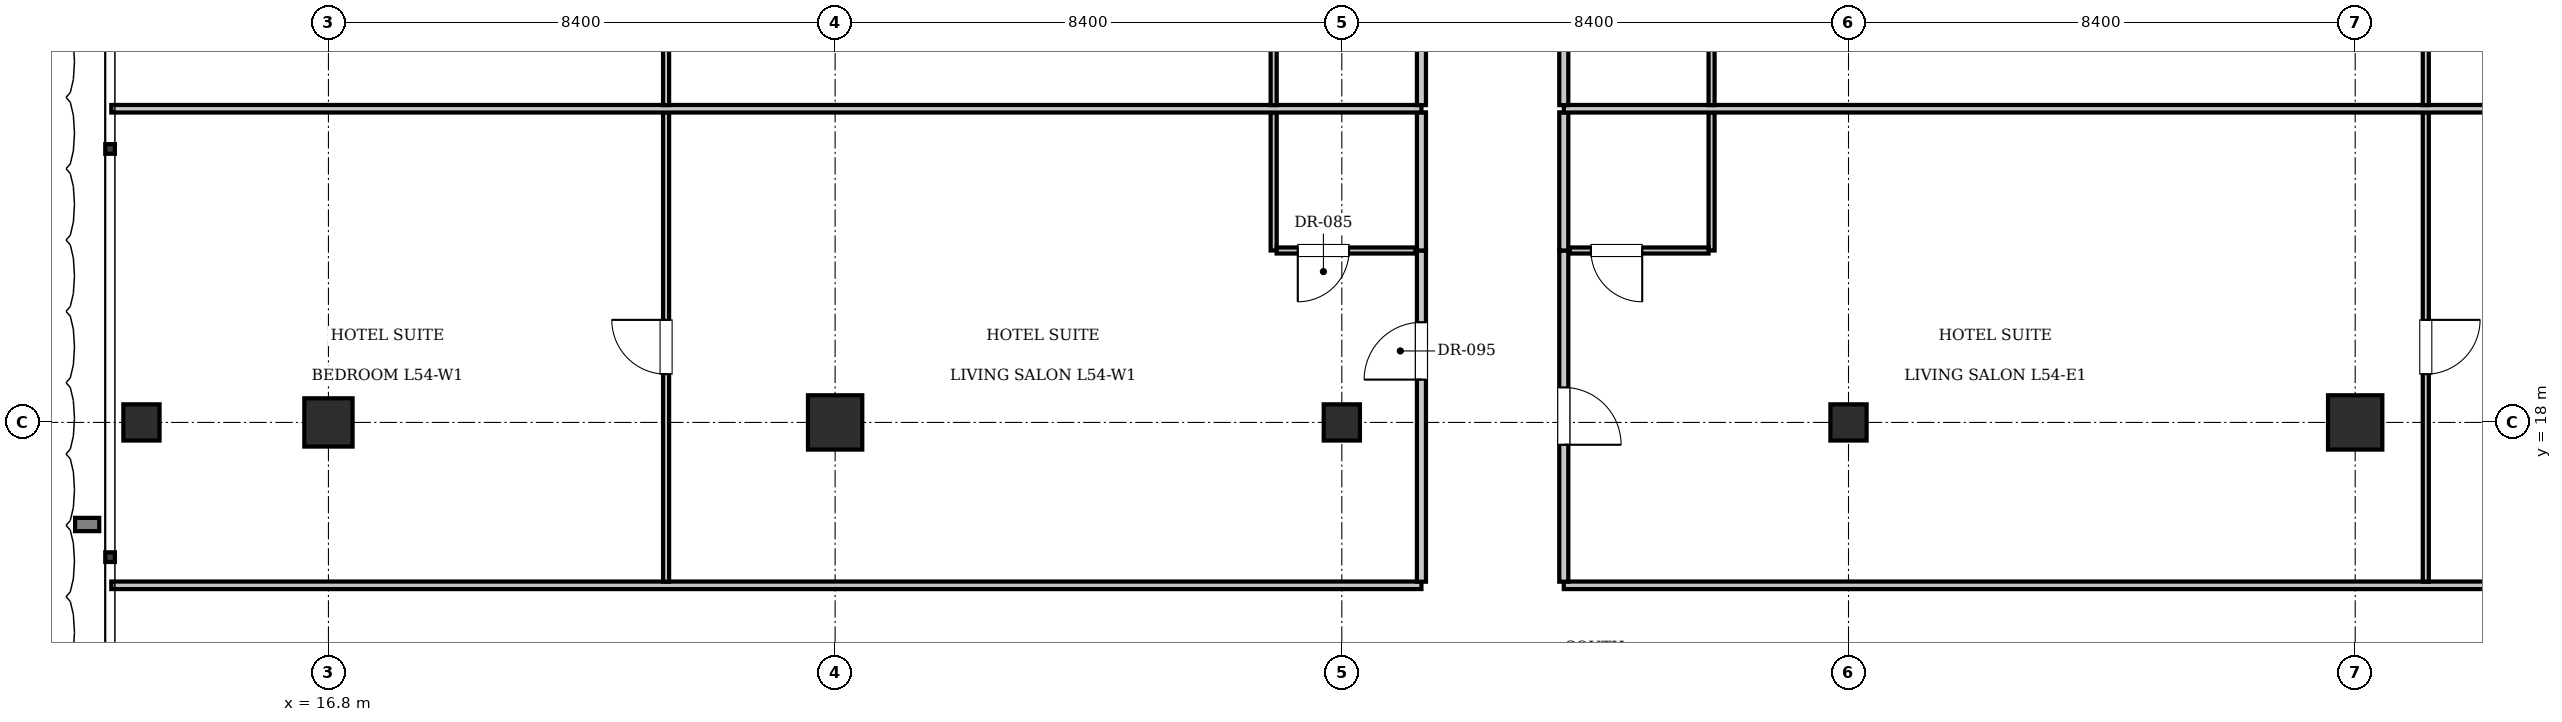
"""IFC4 building model, lengths in metres.
Left out: names, types, materials, properties, quantities, classifications, styles, units other than length and angle.
Written with IfcOpenShell. Run it as: python <this file> out.ifc"""

import sys

from ifc_helpers import new_model, si_unit, direction, frame, frame_2d, origin, origin_2d, place, context, subcontext, project, spatial, rectangle, i_section, extrude, element, fill, save


model = new_model("IFC4")
c1 = context("Model", 3, precision=1e-05, world=origin(), true_north=direction((0.0, 1.0)))
c2 = subcontext(c1, "Body", "Model", "MODEL_VIEW")
j1 = project(units=[si_unit("LENGTHUNIT", "METRE"), si_unit("PLANEANGLEUNIT", "RADIAN")], contexts=[c1])
p1 = place(None, origin())
s1 = spatial("IfcSite", under=j1, at=p1, CompositionType="ELEMENT")
p2 = place(p1, origin())
s2 = spatial("IfcBuilding", under=s1, at=p2, CompositionType="ELEMENT")
p3 = place(p2, frame((0.0, 0.0, 219.8)))
s3 = spatial("IfcBuildingStorey", under=s2, at=p3, CompositionType="ELEMENT", Elevation=219.8)
for number, where, z_axis, x_axis in (
    (1, (25.2, 18.0, 0.0), (0.0, 0.0, 1.0), (1.0, 0.0, 0.0)),
    (2, (50.4, 18.0, 0.0), (0.0, 0.0, 1.0), (1.0, 0.0, 0.0)),
):
    element("IfcColumn", number, at=place(p3, frame(where, z_axis=z_axis, x_axis=x_axis)), inside=s3, PredefinedType="COLUMN", context=c2, shape_type="SweptSolid", body=[
        extrude(rectangle(XDim=0.9, YDim=0.9, at=origin_2d()), origin(), (0.0, 0.0, 1.0), 3.85),
    ])
for number, where, z_axis, x_axis in (
    (3, (33.6, 18.0, 0.0), (0.0, 0.0, 1.0), (1.0, 0.0, 0.0)),
    (4, (42.0, 18.0, 0.0), (0.0, 0.0, 1.0), (1.0, 0.0, 0.0)),
):
    element("IfcColumn", number, at=place(p3, frame(where, z_axis=z_axis, x_axis=x_axis)), inside=s3, PredefinedType="COLUMN", context=c2, shape_type="SweptSolid", body=[
        extrude(i_section(OverallWidth=0.6, OverallDepth=0.6, WebThickness=0.025, FlangeThickness=0.038, at=origin_2d()), origin(), (0.0, 0.0, 1.0), 3.85),
    ])
p4 = place(p3, frame((16.8, 18.0, 0.0), z_axis=(0.0, 0.0, 1.0), x_axis=(1.0, 0.0, 0.0)))
e5 = element("IfcColumn", 5, at=p4, inside=s3, PredefinedType="COLUMN", context=c2, shape_type="SweptSolid", body=[
    extrude(rectangle(XDim=0.8, YDim=0.8, at=origin_2d()), origin(), (0.0, 0.0, 1.0), 3.85),
])
p5 = place(p3, frame((13.7, 18.0, 0.0), z_axis=(0.0, 0.0, 1.0), x_axis=(1.0, 0.0, 0.0)))
e6 = element("IfcColumn", 6, at=p5, inside=s3, PredefinedType="COLUMN", context=c2, shape_type="SweptSolid", body=[
    extrude(i_section(OverallWidth=0.6, OverallDepth=0.6, WebThickness=0.025, FlangeThickness=0.038, at=origin_2d()), origin(), (0.0, 0.0, 1.0), 3.85),
])
p6 = place(p3, frame((13.2, 15.3, 0.0), z_axis=(0.0, 0.0, 1.0), x_axis=(1.0, 0.0, 0.0)))
e7 = element("IfcWall", 7, at=p6, inside=s3, PredefinedType="PARTITIONING", context=c2, shape_type="SweptSolid", body=[
    extrude(rectangle(XDim=21.72, YDim=0.125, at=frame_2d((10.86, 0.0))), origin(), (0.0, 0.0, 1.0), 3.61),
])
p7 = place(p3, frame((37.28, 15.3, 0.0), z_axis=(0.0, 0.0, 1.0), x_axis=(1.0, 0.0, 0.0)))
e8 = element("IfcWall", 8, at=p7, inside=s3, PredefinedType="PARTITIONING", context=c2, shape_type="SweptSolid", body=[
    extrude(rectangle(XDim=25.12, YDim=0.125, at=frame_2d((12.56, 0.0))), origin(), (0.0, 0.0, 1.0), 3.61),
])
p8 = place(p3, frame((34.92, 15.36, 0.0), z_axis=(0.0, 0.0, 1.0), x_axis=(0.0, 1.0, 0.0)))
e9 = element("IfcWall", 9, at=p8, inside=s3, PredefinedType="PARTITIONING", context=c2, shape_type="SweptSolid", body=[
    extrude(rectangle(XDim=5.49, YDim=0.15, at=frame_2d((2.745, 0.0))), origin(), (0.0, 0.0, 1.0), 3.61),
])
p9 = place(p8, frame((3.35, 0.0, 0.0)))
e10 = element("IfcOpeningElement", 10, at=p9, cuts=e9, PredefinedType="OPENING", context=c2, shape_type="SweptSolid", body=[
    extrude(rectangle(XDim=0.95, YDim=2.15, at=frame_2d((0.475, 1.075))), frame((0.0, 0.085, 0.0), z_axis=(0.0, -1.0, 0.0), x_axis=(1.0, 0.0, 0.0)), (0.0, 0.0, 1.0), 0.17),
])
p10 = place(p3, frame((34.92, 20.85, 0.0), z_axis=(0.0, 0.0, 1.0), x_axis=(0.0, 1.0, 0.0)))
e11 = element("IfcWall", 11, at=p10, inside=s3, PredefinedType="PARTITIONING", context=c2, shape_type="SweptSolid", body=[
    extrude(rectangle(XDim=2.29, YDim=0.15, at=frame_2d((1.145, 0.0))), origin(), (0.0, 0.0, 1.0), 3.61),
])
p11 = place(p3, frame((32.47, 20.85, 0.0), z_axis=(0.0, 0.0, 1.0), x_axis=(0.0, 1.0, 0.0)))
e12 = element("IfcWall", 12, at=p11, inside=s3, PredefinedType="PARTITIONING", context=c2, shape_type="SweptSolid", body=[
    extrude(rectangle(XDim=2.29, YDim=0.1, at=frame_2d((1.145, 0.0))), origin(), (0.0, 0.0, 1.0), 3.61),
])
p12 = place(p3, frame((32.52, 20.85, 0.0), z_axis=(0.0, 0.0, 1.0), x_axis=(1.0, 0.0, 0.0)))
e13 = element("IfcWall", 13, at=p12, inside=s3, PredefinedType="PARTITIONING", context=c2, shape_type="SweptSolid", body=[
    extrude(rectangle(XDim=2.3, YDim=0.1, at=frame_2d((1.15, 0.0))), origin(), (0.0, 0.0, 1.0), 3.61),
])
p13 = place(p12, frame((0.35, 0.0, 0.0)))
e14 = element("IfcOpeningElement", 14, at=p13, cuts=e13, PredefinedType="OPENING", context=c2, shape_type="SweptSolid", body=[
    extrude(rectangle(XDim=0.85, YDim=2.1, at=frame_2d((0.425, 1.05))), frame((0.0, 0.06, 0.0), z_axis=(0.0, -1.0, 0.0), x_axis=(1.0, 0.0, 0.0)), (0.0, 0.0, 1.0), 0.12),
])
p14 = place(p3, frame((22.398, 15.36, 0.0), z_axis=(0.0, 0.0, 1.0), x_axis=(0.0, 1.0, 0.0)))
e15 = element("IfcWall", 15, at=p14, inside=s3, PredefinedType="PARTITIONING", context=c2, shape_type="SweptSolid", body=[
    extrude(rectangle(XDim=7.78, YDim=0.1, at=frame_2d((3.89, 0.0))), origin(), (0.0, 0.0, 1.0), 3.61),
])
p15 = place(p14, frame((3.44, 0.0, 0.0)))
e16 = element("IfcOpeningElement", 16, at=p15, cuts=e15, PredefinedType="OPENING", context=c2, shape_type="SweptSolid", body=[
    extrude(rectangle(XDim=0.9, YDim=2.1, at=frame_2d((0.45, 1.05))), frame((0.0, 0.06, 0.0), z_axis=(0.0, -1.0, 0.0), x_axis=(1.0, 0.0, 0.0)), (0.0, 0.0, 1.0), 0.12),
])
p16 = place(p3, frame((37.28, 15.36, 0.0), z_axis=(0.0, 0.0, 1.0), x_axis=(0.0, 1.0, 0.0)))
e17 = element("IfcWall", 17, at=p16, inside=s3, PredefinedType="PARTITIONING", context=c2, shape_type="SweptSolid", body=[
    extrude(rectangle(XDim=5.49, YDim=0.15, at=frame_2d((2.745, 0.0))), origin(), (0.0, 0.0, 1.0), 3.61),
])
p17 = place(p16, frame((2.27, 0.0, 0.0)))
e18 = element("IfcOpeningElement", 18, at=p17, cuts=e17, PredefinedType="OPENING", context=c2, shape_type="SweptSolid", body=[
    extrude(rectangle(XDim=0.95, YDim=2.15, at=frame_2d((0.475, 1.075))), frame((0.0, 0.085, 0.0), z_axis=(0.0, -1.0, 0.0), x_axis=(1.0, 0.0, 0.0)), (0.0, 0.0, 1.0), 0.17),
])
p18 = place(p3, frame((37.28, 20.85, 0.0), z_axis=(0.0, 0.0, 1.0), x_axis=(0.0, 1.0, 0.0)))
e19 = element("IfcWall", 19, at=p18, inside=s3, PredefinedType="PARTITIONING", context=c2, shape_type="SweptSolid", body=[
    extrude(rectangle(XDim=2.29, YDim=0.15, at=frame_2d((1.145, 0.0))), origin(), (0.0, 0.0, 1.0), 3.61),
])
p19 = place(p3, frame((39.73, 20.85, 0.0), z_axis=(0.0, 0.0, 1.0), x_axis=(0.0, 1.0, 0.0)))
e20 = element("IfcWall", 20, at=p19, inside=s3, PredefinedType="PARTITIONING", context=c2, shape_type="SweptSolid", body=[
    extrude(rectangle(XDim=2.29, YDim=0.1, at=frame_2d((1.145, 0.0))), origin(), (0.0, 0.0, 1.0), 3.61),
])
p20 = place(p3, frame((37.38, 20.85, 0.0), z_axis=(0.0, 0.0, 1.0), x_axis=(1.0, 0.0, 0.0)))
e21 = element("IfcWall", 21, at=p20, inside=s3, PredefinedType="PARTITIONING", context=c2, shape_type="SweptSolid", body=[
    extrude(rectangle(XDim=2.3, YDim=0.1, at=frame_2d((1.15, 0.0))), origin(), (0.0, 0.0, 1.0), 3.61),
])
p21 = place(p20, frame((0.35, 0.0, 0.0)))
e22 = element("IfcOpeningElement", 22, at=p21, cuts=e21, PredefinedType="OPENING", context=c2, shape_type="SweptSolid", body=[
    extrude(rectangle(XDim=0.85, YDim=2.1, at=frame_2d((0.425, 1.05))), frame((0.0, 0.06, 0.0), z_axis=(0.0, -1.0, 0.0), x_axis=(1.0, 0.0, 0.0)), (0.0, 0.0, 1.0), 0.12),
])
p22 = place(p3, frame((51.57, 15.36, 0.0), z_axis=(0.0, 0.0, 1.0), x_axis=(0.0, 1.0, 0.0)))
e23 = element("IfcWall", 23, at=p22, inside=s3, PredefinedType="PARTITIONING", context=c2, shape_type="SweptSolid", body=[
    extrude(rectangle(XDim=7.78, YDim=0.1, at=frame_2d((3.89, 0.0))), origin(), (0.0, 0.0, 1.0), 3.61),
])
p23 = place(p22, frame((3.44, 0.0, 0.0)))
e24 = element("IfcOpeningElement", 24, at=p23, cuts=e23, PredefinedType="OPENING", context=c2, shape_type="SweptSolid", body=[
    extrude(rectangle(XDim=0.9, YDim=2.1, at=frame_2d((0.45, 1.05))), frame((0.0, 0.06, 0.0), z_axis=(0.0, -1.0, 0.0), x_axis=(1.0, 0.0, 0.0)), (0.0, 0.0, 1.0), 0.12),
])
p24 = place(p3, frame((13.2, 23.2, 0.0), z_axis=(0.0, 0.0, 1.0), x_axis=(1.0, 0.0, 0.0)))
e25 = element("IfcWall", 25, at=p24, inside=s3, PredefinedType="PARTITIONING", context=c2, shape_type="SweptSolid", body=[
    extrude(rectangle(XDim=21.72, YDim=0.125, at=frame_2d((10.86, 0.0))), origin(), (0.0, 0.0, 1.0), 3.61),
])
p25 = place(p3, frame((37.28, 23.2, 0.0), z_axis=(0.0, 0.0, 1.0), x_axis=(1.0, 0.0, 0.0)))
e26 = element("IfcWall", 26, at=p25, inside=s3, PredefinedType="PARTITIONING", context=c2, shape_type="SweptSolid", body=[
    extrude(rectangle(XDim=25.12, YDim=0.125, at=frame_2d((12.56, 0.0))), origin(), (0.0, 0.0, 1.0), 3.61),
])
p26 = place(p3, frame((34.92, 23.26, 0.0), z_axis=(0.0, 0.0, 1.0), x_axis=(0.0, 1.0, 0.0)))
e27 = element("IfcWall", 27, at=p26, inside=s3, PredefinedType="PARTITIONING", context=c2, shape_type="SweptSolid", body=[
    extrude(rectangle(XDim=2.29, YDim=0.15, at=frame_2d((1.145, 0.0))), origin(), (0.0, 0.0, 1.0), 3.61),
])
p27 = place(p3, frame((32.47, 23.26, 0.0), z_axis=(0.0, 0.0, 1.0), x_axis=(0.0, 1.0, 0.0)))
e28 = element("IfcWall", 28, at=p27, inside=s3, PredefinedType="PARTITIONING", context=c2, shape_type="SweptSolid", body=[
    extrude(rectangle(XDim=2.29, YDim=0.1, at=frame_2d((1.145, 0.0))), origin(), (0.0, 0.0, 1.0), 3.61),
])
p28 = place(p3, frame((22.398, 23.26, 0.0), z_axis=(0.0, 0.0, 1.0), x_axis=(0.0, 1.0, 0.0)))
e29 = element("IfcWall", 29, at=p28, inside=s3, PredefinedType="PARTITIONING", context=c2, shape_type="SweptSolid", body=[
    extrude(rectangle(XDim=7.78, YDim=0.1, at=frame_2d((3.89, 0.0))), origin(), (0.0, 0.0, 1.0), 3.61),
])
p29 = place(p28, frame((3.44, 0.0, 0.0)))
e30 = element("IfcOpeningElement", 30, at=p29, cuts=e29, PredefinedType="OPENING", context=c2, shape_type="SweptSolid", body=[
    extrude(rectangle(XDim=0.9, YDim=2.1, at=frame_2d((0.45, 1.05))), frame((0.0, 0.06, 0.0), z_axis=(0.0, -1.0, 0.0), x_axis=(1.0, 0.0, 0.0)), (0.0, 0.0, 1.0), 0.12),
])
p30 = place(p3, frame((37.28, 23.26, 0.0), z_axis=(0.0, 0.0, 1.0), x_axis=(0.0, 1.0, 0.0)))
e31 = element("IfcWall", 31, at=p30, inside=s3, PredefinedType="PARTITIONING", context=c2, shape_type="SweptSolid", body=[
    extrude(rectangle(XDim=2.29, YDim=0.15, at=frame_2d((1.145, 0.0))), origin(), (0.0, 0.0, 1.0), 3.61),
])
p31 = place(p3, frame((39.73, 23.26, 0.0), z_axis=(0.0, 0.0, 1.0), x_axis=(0.0, 1.0, 0.0)))
e32 = element("IfcWall", 32, at=p31, inside=s3, PredefinedType="PARTITIONING", context=c2, shape_type="SweptSolid", body=[
    extrude(rectangle(XDim=2.29, YDim=0.1, at=frame_2d((1.145, 0.0))), origin(), (0.0, 0.0, 1.0), 3.61),
])
p32 = place(p3, frame((51.57, 23.26, 0.0), z_axis=(0.0, 0.0, 1.0), x_axis=(0.0, 1.0, 0.0)))
e33 = element("IfcWall", 33, at=p32, inside=s3, PredefinedType="PARTITIONING", context=c2, shape_type="SweptSolid", body=[
    extrude(rectangle(XDim=7.78, YDim=0.1, at=frame_2d((3.89, 0.0))), origin(), (0.0, 0.0, 1.0), 3.61),
])
p33 = place(p32, frame((5.0, 0.0, 0.0)))
e34 = element("IfcOpeningElement", 34, at=p33, cuts=e33, PredefinedType="OPENING", context=c2, shape_type="SweptSolid", body=[
    extrude(rectangle(XDim=0.9, YDim=2.1, at=frame_2d((0.45, 1.05))), frame((0.0, 0.06, 0.0), z_axis=(0.0, -1.0, 0.0), x_axis=(1.0, 0.0, 0.0)), (0.0, 0.0, 1.0), 0.12),
])
p34 = place(p13, frame((0.85, 0.0, 0.0), z_axis=(0.0, 0.0, 1.0), x_axis=(-1.0, 0.0, 0.0)))
e35 = element("IfcDoor", 35, at=p34, inside=s3, OperationType="SINGLE_SWING_RIGHT", PredefinedType="DOOR", context=c2, shape_type="SweptSolid", body=[
    extrude(rectangle(XDim=0.85, YDim=2.1, at=frame_2d((0.425, 1.05))), frame((0.0, 0.025, 0.0), z_axis=(0.0, -1.0, 0.0), x_axis=(1.0, 0.0, 0.0)), (0.0, 0.0, 1.0), 0.05),
])
fill(e14, e35)
p35 = place(p9, origin())
e36 = element("IfcDoor", 36, at=p35, inside=s3, OperationType="SINGLE_SWING_LEFT", PredefinedType="DOOR", context=c2, shape_type="SweptSolid", body=[
    extrude(rectangle(XDim=0.95, YDim=2.15, at=frame_2d((0.475, 1.075))), frame((0.0, 0.025, 0.0), z_axis=(0.0, -1.0, 0.0), x_axis=(1.0, 0.0, 0.0)), (0.0, 0.0, 1.0), 0.05),
])
fill(e10, e36)
p36 = place(p15, origin())
e37 = element("IfcDoor", 37, at=p36, inside=s3, OperationType="SINGLE_SWING_RIGHT", PredefinedType="DOOR", context=c2, shape_type="SweptSolid", body=[
    extrude(rectangle(XDim=0.9, YDim=2.1, at=frame_2d((0.45, 1.05))), frame((0.0, 0.025, 0.0), z_axis=(0.0, -1.0, 0.0), x_axis=(1.0, 0.0, 0.0)), (0.0, 0.0, 1.0), 0.05),
])
fill(e16, e37)
p37 = place(p21, frame((0.85, 0.0, 0.0), z_axis=(0.0, 0.0, 1.0), x_axis=(-1.0, 0.0, 0.0)))
e38 = element("IfcDoor", 38, at=p37, inside=s3, OperationType="SINGLE_SWING_LEFT", PredefinedType="DOOR", context=c2, shape_type="SweptSolid", body=[
    extrude(rectangle(XDim=0.85, YDim=2.1, at=frame_2d((0.425, 1.05))), frame((0.0, 0.025, 0.0), z_axis=(0.0, -1.0, 0.0), x_axis=(1.0, 0.0, 0.0)), (0.0, 0.0, 1.0), 0.05),
])
fill(e22, e38)
p38 = place(p17, frame((0.95, 0.0, 0.0), z_axis=(0.0, 0.0, 1.0), x_axis=(-1.0, 0.0, 0.0)))
e39 = element("IfcDoor", 39, at=p38, inside=s3, OperationType="SINGLE_SWING_RIGHT", PredefinedType="DOOR", context=c2, shape_type="SweptSolid", body=[
    extrude(rectangle(XDim=0.95, YDim=2.15, at=frame_2d((0.475, 1.075))), frame((0.0, 0.025, 0.0), z_axis=(0.0, -1.0, 0.0), x_axis=(1.0, 0.0, 0.0)), (0.0, 0.0, 1.0), 0.05),
])
fill(e18, e39)
p39 = place(p23, frame((0.9, 0.0, 0.0), z_axis=(0.0, 0.0, 1.0), x_axis=(-1.0, 0.0, 0.0)))
e40 = element("IfcDoor", 40, at=p39, inside=s3, OperationType="SINGLE_SWING_LEFT", PredefinedType="DOOR", context=c2, shape_type="SweptSolid", body=[
    extrude(rectangle(XDim=0.9, YDim=2.1, at=frame_2d((0.45, 1.05))), frame((0.0, 0.025, 0.0), z_axis=(0.0, -1.0, 0.0), x_axis=(1.0, 0.0, 0.0)), (0.0, 0.0, 1.0), 0.05),
])
fill(e24, e40)
save(model, sys.argv[1])
